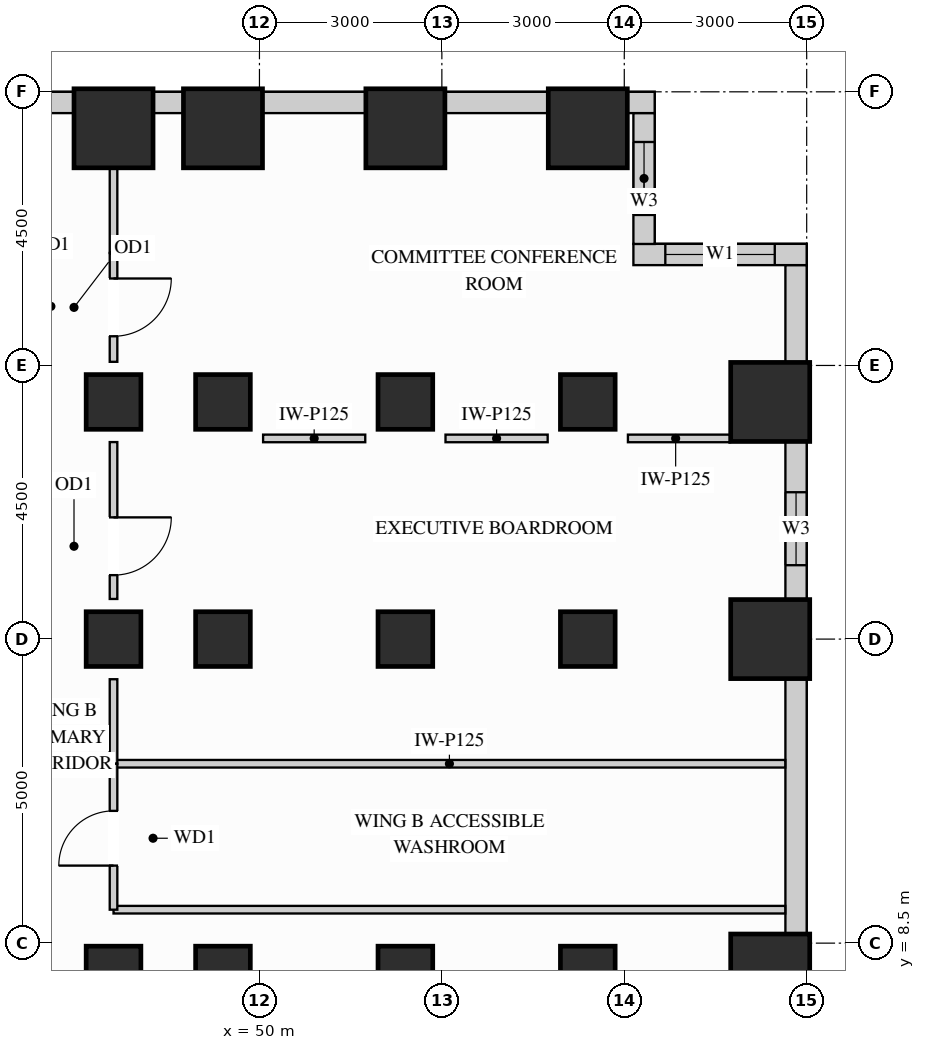
"""IFC4 building model, lengths in metres.
Left out: names, types, materials, properties, quantities, classifications, styles, units other than length and angle.
Written with IfcOpenShell. Run it as: python <this file> out.ifc"""

import sys

from ifc_helpers import new_model, si_unit, direction, frame, frame_2d, origin, origin_2d, place, context, subcontext, project, spatial, rectangle, extrude, source, transform, mapped, element, fill, save


model = new_model("IFC4")
c1 = context("Model", 3, precision=1e-05, world=origin(), true_north=direction((0.0, 1.0)))
c2 = subcontext(c1, "Body", "Model", "MODEL_VIEW")
j1 = project(units=[si_unit("LENGTHUNIT", "METRE"), si_unit("PLANEANGLEUNIT", "RADIAN")], contexts=[c1])
p1 = place(None, origin())
s1 = spatial("IfcSite", under=j1, at=p1, CompositionType="ELEMENT")
p2 = place(p1, origin())
s2 = spatial("IfcBuilding", under=s1, at=p2, CompositionType="ELEMENT")
p3 = place(p2, frame((0.0, 0.0, 29.7)))
s3 = spatial("IfcBuildingStorey", under=s2, at=p3, CompositionType="ELEMENT", Elevation=29.7)
m1 = source(origin(), c2, "Body", "SweptSolid", [
    extrude(rectangle(XDim=0.9, YDim=0.9, at=origin_2d()), origin(), (0.0, 0.0, 1.0), 3.38),
])
for number, where, z_axis, x_axis in (
    (1, (47.6, 13.5, 0.0), (0.0, 0.0, 1.0), (1.0, 0.0, 0.0)),
    (2, (47.6, 8.0, 0.0), (0.0, 0.0, 1.0), (1.0, 0.0, 0.0)),
    (3, (47.6, 17.4, 0.0), (0.0, 0.0, 1.0), (1.0, 0.0, 0.0)),
    (4, (49.4, 13.5, 0.0), (0.0, 0.0, 1.0), (1.0, 0.0, 0.0)),
    (5, (49.4, 17.4, 0.0), (0.0, 0.0, 1.0), (1.0, 0.0, 0.0)),
    (6, (49.4, 8.0, 0.0), (0.0, 0.0, 1.0), (1.0, 0.0, 0.0)),
    (7, (52.4, 13.5, 0.0), (0.0, 0.0, 1.0), (1.0, 0.0, 0.0)),
    (8, (52.4, 17.4, 0.0), (0.0, 0.0, 1.0), (1.0, 0.0, 0.0)),
    (9, (52.4, 8.0, 0.0), (0.0, 0.0, 1.0), (1.0, 0.0, 0.0)),
    (10, (55.4, 13.5, 0.0), (0.0, 0.0, 1.0), (1.0, 0.0, 0.0)),
    (11, (55.4, 17.4, 0.0), (0.0, 0.0, 1.0), (1.0, 0.0, 0.0)),
    (12, (55.4, 8.0, 0.0), (0.0, 0.0, 1.0), (1.0, 0.0, 0.0)),
):
    element("IfcColumn", number, at=place(p3, frame(where, z_axis=z_axis, x_axis=x_axis)), inside=s3, PredefinedType="COLUMN", context=c2, shape_type="MappedRepresentation", body=[
        mapped(m1, transform((0.0, 0.0, 0.0), x_axis=(1.0, 0.0, 0.0), y_axis=(0.0, 1.0, 0.0), z_axis=(0.0, 0.0, 1.0))),
    ])
m2 = source(origin(), c2, "Body", "SweptSolid", [
    extrude(rectangle(XDim=1.3, YDim=1.3, at=origin_2d()), origin(), (0.0, 0.0, 1.0), 3.38),
])
for number, where, z_axis, x_axis in (
    (13, (47.6, 21.9, 0.0), (0.0, 0.0, 1.0), (1.0, 0.0, 0.0)),
    (14, (49.4, 21.9, 0.0), (0.0, 0.0, 1.0), (1.0, 0.0, 0.0)),
    (15, (52.4, 21.9, 0.0), (0.0, 0.0, 1.0), (1.0, 0.0, 0.0)),
    (16, (55.4, 21.9, 0.0), (0.0, 0.0, 1.0), (1.0, 0.0, 0.0)),
    (17, (58.4, 13.5, 0.0), (0.0, 0.0, 1.0), (1.0, 0.0, 0.0)),
    (18, (58.4, 17.4, 0.0), (0.0, 0.0, 1.0), (1.0, 0.0, 0.0)),
    (19, (58.4, 8.0, 0.0), (0.0, 0.0, 1.0), (1.0, 0.0, 0.0)),
):
    element("IfcColumn", number, at=place(p3, frame(where, z_axis=z_axis, x_axis=x_axis)), inside=s3, PredefinedType="COLUMN", context=c2, shape_type="MappedRepresentation", body=[
        mapped(m2, transform((0.0, 0.0, 0.0), x_axis=(1.0, 0.0, 0.0), y_axis=(0.0, 1.0, 0.0), z_axis=(0.0, 0.0, 1.0))),
    ])
m3 = source(origin(), c2, "Body", "SweptSolid", [
    extrude(rectangle(XDim=4.204, YDim=0.35, at=frame_2d((2.102, 0.0))), origin(), (0.0, 0.0, 1.0), 2.51),
])
p4 = place(p3, frame((58.825, 8.648, 0.0), z_axis=(0.0, 0.0, 1.0), x_axis=(0.0, 1.0, 0.0)))
e20 = element("IfcWall", 20, at=p4, inside=s3, PredefinedType="SOLIDWALL", context=c2, shape_type="MappedRepresentation", body=[
    mapped(m3, transform((0.0, 0.0, 0.0), x_axis=(1.0, 0.0, 0.0), y_axis=(0.0, 1.0, 0.0), z_axis=(0.0, 0.0, 1.0))),
])
p5 = place(p3, frame((58.825, 14.148, 0.0), z_axis=(0.0, 0.0, 1.0), x_axis=(0.0, 1.0, 0.0)))
e21 = element("IfcWall", 21, at=p5, inside=s3, PredefinedType="SOLIDWALL", context=c2, shape_type="SweptSolid", body=[
    extrude(rectangle(XDim=2.604, YDim=0.35, at=frame_2d((1.302, 0.0))), origin(), (0.0, 0.0, 1.0), 2.51),
])
p6 = place(p5, frame((0.567, 0.0, 0.78)))
e22 = element("IfcOpeningElement", 22, at=p6, cuts=e21, PredefinedType="OPENING", context=c2, shape_type="SweptSolid", body=[
    extrude(rectangle(XDim=1.2, YDim=1.55, at=frame_2d((0.6, 0.775))), frame((0.0, 0.185, 0.0), z_axis=(0.0, -1.0, 0.0), x_axis=(1.0, 0.0, 0.0)), (0.0, 0.0, 1.0), 0.37),
])
m4 = source(origin(), c2, "Body", "SweptSolid", [
    extrude(rectangle(XDim=1.604, YDim=0.35, at=frame_2d((0.802, 0.0))), origin(), (0.0, 0.0, 1.0), 3.365),
])
p7 = place(p3, frame((58.825, 18.048, 0.0), z_axis=(0.0, 0.0, 1.0), x_axis=(0.0, 1.0, 0.0)))
e23 = element("IfcWall", 23, at=p7, inside=s3, PredefinedType="SOLIDWALL", context=c2, shape_type="MappedRepresentation", body=[
    mapped(m4, transform((0.0, 0.0, 0.0), x_axis=(1.0, 0.0, 0.0), y_axis=(0.0, 1.0, 0.0), z_axis=(0.0, 0.0, 1.0))),
])
p8 = place(p3, frame((59.0, 19.825, 0.0), z_axis=(0.0, 0.0, 1.0), x_axis=(-1.0, 0.0, 0.0)))
e24 = element("IfcWall", 24, at=p8, inside=s3, PredefinedType="SOLIDWALL", context=c2, shape_type="SweptSolid", body=[
    extrude(rectangle(XDim=2.85, YDim=0.35, at=frame_2d((1.425, 0.0))), origin(), (0.0, 0.0, 1.0), 3.365),
])
p9 = place(p8, frame((0.525, 0.0, 0.78)))
e25 = element("IfcOpeningElement", 25, at=p9, cuts=e24, PredefinedType="OPENING", context=c2, shape_type="SweptSolid", body=[
    extrude(rectangle(XDim=1.8, YDim=2.1, at=frame_2d((0.9, 1.05))), frame((0.0, 0.185, 0.0), z_axis=(0.0, -1.0, 0.0), x_axis=(1.0, 0.0, 0.0)), (0.0, 0.0, 1.0), 0.37),
])
p10 = place(p3, frame((56.325, 19.998, 0.0), z_axis=(0.0, 0.0, 1.0), x_axis=(0.0, 1.0, 0.0)))
e26 = element("IfcWall", 26, at=p10, inside=s3, PredefinedType="SOLIDWALL", context=c2, shape_type="SweptSolid", body=[
    extrude(rectangle(XDim=2.154, YDim=0.35, at=frame_2d((1.077, 0.0))), origin(), (0.0, 0.0, 1.0), 3.365),
])
p11 = place(p10, frame((0.477, 0.0, 0.78)))
e27 = element("IfcOpeningElement", 27, at=p11, cuts=e26, PredefinedType="OPENING", context=c2, shape_type="SweptSolid", body=[
    extrude(rectangle(XDim=1.2, YDim=2.1, at=frame_2d((0.6, 1.05))), frame((0.0, 0.185, 0.0), z_axis=(0.0, -1.0, 0.0), x_axis=(1.0, 0.0, 0.0)), (0.0, 0.0, 1.0), 0.37),
])
m5 = source(origin(), c2, "Body", "SweptSolid", [
    extrude(rectangle(XDim=0.452, YDim=0.35, at=frame_2d((0.226, 0.0))), origin(), (0.0, 0.0, 1.0), 3.365),
])
p12 = place(p3, frame((56.5, 22.325, 0.0), z_axis=(0.0, 0.0, 1.0), x_axis=(-1.0, 0.0, 0.0)))
e28 = element("IfcWall", 28, at=p12, inside=s3, PredefinedType="SOLIDWALL", context=c2, shape_type="MappedRepresentation", body=[
    mapped(m5, transform((0.0, 0.0, 0.0), x_axis=(1.0, 0.0, 0.0), y_axis=(0.0, 1.0, 0.0), z_axis=(0.0, 0.0, 1.0))),
])
m6 = source(origin(), c2, "Body", "SweptSolid", [
    extrude(rectangle(XDim=1.704, YDim=0.35, at=frame_2d((0.852, 0.0))), origin(), (0.0, 0.0, 1.0), 2.51),
])
for number, where, z_axis, x_axis in (
    (29, (54.752, 22.325, 0.0), (0.0, 0.0, 1.0), (-1.0, 0.0, 0.0)),
    (30, (51.752, 22.325, 0.0), (0.0, 0.0, 1.0), (-1.0, 0.0, 0.0)),
):
    element("IfcWall", number, at=place(p3, frame(where, z_axis=z_axis, x_axis=x_axis)), inside=s3, PredefinedType="SOLIDWALL", context=c2, shape_type="MappedRepresentation", body=[
        mapped(m6, transform((0.0, 0.0, 0.0), x_axis=(1.0, 0.0, 0.0), y_axis=(0.0, 1.0, 0.0), z_axis=(0.0, 0.0, 1.0))),
    ])
m7 = source(origin(), c2, "Body", "SweptSolid", [
    extrude(rectangle(XDim=0.504, YDim=0.35, at=frame_2d((0.252, 0.0))), origin(), (0.0, 0.0, 1.0), 3.365),
])
p13 = place(p3, frame((48.752, 22.325, 0.0), z_axis=(0.0, 0.0, 1.0), x_axis=(-1.0, 0.0, 0.0)))
e31 = element("IfcWall", 31, at=p13, inside=s3, PredefinedType="SOLIDWALL", context=c2, shape_type="MappedRepresentation", body=[
    mapped(m7, transform((0.0, 0.0, 0.0), x_axis=(1.0, 0.0, 0.0), y_axis=(0.0, 1.0, 0.0), z_axis=(0.0, 0.0, 1.0))),
])
p14 = place(p3, frame((46.952, 22.325, 0.0), z_axis=(0.0, 0.0, 1.0), x_axis=(-1.0, 0.0, 0.0)))
e32 = element("IfcWall", 32, at=p14, inside=s3, PredefinedType="SOLIDWALL", context=c2, shape_type="SweptSolid", body=[
    extrude(rectangle(XDim=6.304, YDim=0.35, at=frame_2d((3.152, 0.0))), origin(), (0.0, 0.0, 1.0), 2.51),
])
p15 = place(p14, frame((1.649, 0.0, 0.78)))
e33 = element("IfcOpeningElement", 33, at=p15, cuts=e32, PredefinedType="OPENING", context=c2, shape_type="SweptSolid", body=[
    extrude(rectangle(XDim=1.8, YDim=1.55, at=frame_2d((0.9, 0.775))), frame((0.0, 0.185, 0.0), z_axis=(0.0, -1.0, 0.0), x_axis=(1.0, 0.0, 0.0)), (0.0, 0.0, 1.0), 0.37),
])
p16 = place(p14, frame((3.817, 0.0, 0.78)))
e34 = element("IfcOpeningElement", 34, at=p16, cuts=e32, PredefinedType="OPENING", context=c2, shape_type="SweptSolid", body=[
    extrude(rectangle(XDim=1.8, YDim=1.55, at=frame_2d((0.9, 0.775))), frame((0.0, 0.185, 0.0), z_axis=(0.0, -1.0, 0.0), x_axis=(1.0, 0.0, 0.0)), (0.0, 0.0, 1.0), 0.37),
])
m8 = source(origin(), c2, "Body", "SweptSolid", [
    extrude(rectangle(XDim=11.048, YDim=0.125, at=frame_2d((5.524, 0.0))), origin(), (0.0, 0.0, 1.0), 3.365),
])
p17 = place(p3, frame((47.6, 11.45, 0.0), z_axis=(0.0, 0.0, 1.0), x_axis=(1.0, 0.0, 0.0)))
e35 = element("IfcWall", 35, at=p17, inside=s3, PredefinedType="PARTITIONING", context=c2, shape_type="MappedRepresentation", body=[
    mapped(m8, transform((0.0, 0.0, 0.0), x_axis=(1.0, 0.0, 0.0), y_axis=(0.0, 1.0, 0.0), z_axis=(0.0, 0.0, 1.0))),
])
m9 = source(origin(), c2, "Body", "SweptSolid", [
    extrude(rectangle(XDim=1.68, YDim=0.125, at=frame_2d((0.84, 0.0))), origin(), (0.0, 0.0, 1.0), 2.67),
])
for number, where, z_axis, x_axis in (
    (36, (50.06, 16.8, 0.0), (0.0, 0.0, 1.0), (1.0, 0.0, 0.0)),
    (37, (53.06, 16.8, 0.0), (0.0, 0.0, 1.0), (1.0, 0.0, 0.0)),
    (38, (56.06, 16.8, 0.0), (0.0, 0.0, 1.0), (1.0, 0.0, 0.0)),
):
    element("IfcWall", number, at=place(p3, frame(where, z_axis=z_axis, x_axis=x_axis)), inside=s3, PredefinedType="PARTITIONING", context=c2, shape_type="MappedRepresentation", body=[
        mapped(m9, transform((0.0, 0.0, 0.0), x_axis=(1.0, 0.0, 0.0), y_axis=(0.0, 1.0, 0.0), z_axis=(0.0, 0.0, 1.0))),
    ])
p18 = place(p3, frame((47.6, 9.05, 0.0), z_axis=(0.0, 0.0, 1.0), x_axis=(1.0, 0.0, 0.0)))
e39 = element("IfcWall", 39, at=p18, inside=s3, PredefinedType="PARTITIONING", context=c2, shape_type="MappedRepresentation", body=[
    mapped(m8, transform((0.0, 0.0, 0.0), x_axis=(1.0, 0.0, 0.0), y_axis=(0.0, 1.0, 0.0), z_axis=(0.0, 0.0, 1.0))),
])
m10 = source(origin(), c2, "Body", "SweptSolid", [
    extrude(rectangle(XDim=1.39, YDim=0.125, at=frame_2d((0.695, 0.0))), origin(), (0.0, 0.0, 1.0), 2.67),
])
p19 = place(p3, frame((47.6, 11.45, 0.0), z_axis=(0.0, 0.0, 1.0), x_axis=(0.0, 1.0, 0.0)))
e40 = element("IfcWall", 40, at=p19, inside=s3, PredefinedType="PARTITIONING", context=c2, shape_type="MappedRepresentation", body=[
    mapped(m10, transform((0.0, 0.0, 0.0), x_axis=(1.0, 0.0, 0.0), y_axis=(0.0, 1.0, 0.0), z_axis=(0.0, 0.0, 1.0))),
])
p20 = place(p3, frame((47.6, 14.16, 0.0), z_axis=(0.0, 0.0, 1.0), x_axis=(0.0, 1.0, 0.0)))
e41 = element("IfcWall", 41, at=p20, inside=s3, PredefinedType="PARTITIONING", context=c2, shape_type="SweptSolid", body=[
    extrude(rectangle(XDim=2.58, YDim=0.125, at=frame_2d((1.29, 0.0))), origin(), (0.0, 0.0, 1.0), 2.67),
])
p21 = place(p20, frame((0.392, 0.0, 0.0)))
e42 = element("IfcOpeningElement", 42, at=p21, cuts=e41, PredefinedType="OPENING", context=c2, shape_type="SweptSolid", body=[
    extrude(rectangle(XDim=0.95, YDim=2.15, at=frame_2d((0.475, 1.075))), frame((0.0, 0.073, 0.0), z_axis=(0.0, -1.0, 0.0), x_axis=(1.0, 0.0, 0.0)), (0.0, 0.0, 1.0), 0.145),
])
p22 = place(p3, frame((47.6, 18.06, 0.0), z_axis=(0.0, 0.0, 1.0), x_axis=(0.0, 1.0, 0.0)))
e43 = element("IfcWall", 43, at=p22, inside=s3, PredefinedType="PARTITIONING", context=c2, shape_type="SweptSolid", body=[
    extrude(rectangle(XDim=1.79, YDim=0.125, at=frame_2d((0.895, 0.0))), origin(), (0.0, 0.0, 1.0), 2.67),
])
p23 = place(p22, frame((0.42, 0.0, 0.0)))
e44 = element("IfcOpeningElement", 44, at=p23, cuts=e43, PredefinedType="OPENING", context=c2, shape_type="SweptSolid", body=[
    extrude(rectangle(XDim=0.95, YDim=2.15, at=frame_2d((0.475, 1.075))), frame((0.0, 0.073, 0.0), z_axis=(0.0, -1.0, 0.0), x_axis=(1.0, 0.0, 0.0)), (0.0, 0.0, 1.0), 0.145),
])
m11 = source(origin(), c2, "Body", "SweptSolid", [
    extrude(rectangle(XDim=1.39, YDim=0.125, at=frame_2d((0.695, 0.0))), origin(), (0.0, 0.0, 1.0), 2.67),
])
p24 = place(p3, frame((47.6, 19.85, 0.0), z_axis=(0.0, 0.0, 1.0), x_axis=(0.0, 1.0, 0.0)))
e45 = element("IfcWall", 45, at=p24, inside=s3, PredefinedType="PARTITIONING", context=c2, shape_type="MappedRepresentation", body=[
    mapped(m11, transform((0.0, 0.0, 0.0), x_axis=(1.0, 0.0, 0.0), y_axis=(0.0, 1.0, 0.0), z_axis=(0.0, 0.0, 1.0))),
])
p25 = place(p3, frame((47.6, 9.05, 0.0), z_axis=(0.0, 0.0, 1.0), x_axis=(0.0, 1.0, 0.0)))
e46 = element("IfcWall", 46, at=p25, inside=s3, PredefinedType="PARTITIONING", context=c2, shape_type="SweptSolid", body=[
    extrude(rectangle(XDim=2.4, YDim=0.125, at=frame_2d((1.2, 0.0))), origin(), (0.0, 0.0, 1.0), 2.67),
])
p26 = place(p25, frame((0.725, 0.0, 0.0)))
e47 = element("IfcOpeningElement", 47, at=p26, cuts=e46, PredefinedType="OPENING", context=c2, shape_type="SweptSolid", body=[
    extrude(rectangle(XDim=0.9, YDim=2.15, at=frame_2d((0.45, 1.075))), frame((0.0, 0.073, 0.0), z_axis=(0.0, -1.0, 0.0), x_axis=(1.0, 0.0, 0.0)), (0.0, 0.0, 1.0), 0.145),
])
m12 = source(origin(), c2, "Body", "SweptSolid", [
    extrude(rectangle(XDim=0.95, YDim=2.15, at=frame_2d((0.475, 1.075))), frame((0.0, 0.025, 0.0), z_axis=(0.0, -1.0, 0.0), x_axis=(1.0, 0.0, 0.0)), (0.0, 0.0, 1.0), 0.05),
])
p27 = place(p21, origin())
e48 = element("IfcDoor", 48, at=p27, inside=s3, OperationType="SINGLE_SWING_RIGHT", PredefinedType="DOOR", context=c2, shape_type="MappedRepresentation", body=[
    mapped(m12, transform((0.0, 0.0, 0.0), x_axis=(1.0, 0.0, 0.0), y_axis=(0.0, 1.0, 0.0), z_axis=(0.0, 0.0, 1.0))),
])
fill(e42, e48)
p28 = place(p23, origin())
e49 = element("IfcDoor", 49, at=p28, inside=s3, OperationType="SINGLE_SWING_RIGHT", PredefinedType="DOOR", context=c2, shape_type="MappedRepresentation", body=[
    mapped(m12, transform((0.0, 0.0, 0.0), x_axis=(1.0, 0.0, 0.0), y_axis=(0.0, 1.0, 0.0), z_axis=(0.0, 0.0, 1.0))),
])
fill(e44, e49)
m13 = source(origin(), c2, "Body", "SweptSolid", [
    extrude(rectangle(XDim=0.9, YDim=2.15, at=frame_2d((0.45, 1.075))), frame((0.0, 0.025, 0.0), z_axis=(0.0, -1.0, 0.0), x_axis=(1.0, 0.0, 0.0)), (0.0, 0.0, 1.0), 0.05),
])
p29 = place(p26, origin())
e50 = element("IfcDoor", 50, at=p29, inside=s3, OperationType="SINGLE_SWING_LEFT", PredefinedType="DOOR", context=c2, shape_type="MappedRepresentation", body=[
    mapped(m13, transform((0.0, 0.0, 0.0), x_axis=(1.0, 0.0, 0.0), y_axis=(0.0, 1.0, 0.0), z_axis=(0.0, 0.0, 1.0))),
])
fill(e47, e50)
m14 = source(origin(), c2, "Body", "SweptSolid", [
    extrude(rectangle(XDim=1.8, YDim=2.1, at=frame_2d((0.9, 1.05))), frame((0.0, 0.03, 0.0), z_axis=(0.0, -1.0, 0.0), x_axis=(1.0, 0.0, 0.0)), (0.0, 0.0, 1.0), 0.06),
])
p30 = place(p9, origin())
e51 = element("IfcWindow", 51, at=p30, inside=s3, PartitioningType="SINGLE_PANEL", PredefinedType="WINDOW", context=c2, shape_type="MappedRepresentation", body=[
    mapped(m14, transform((0.0, 0.0, 0.0), x_axis=(1.0, 0.0, 0.0), y_axis=(0.0, 1.0, 0.0), z_axis=(0.0, 0.0, 1.0))),
])
fill(e25, e51)
m15 = source(origin(), c2, "Body", "SweptSolid", [
    extrude(rectangle(XDim=1.2, YDim=1.55, at=frame_2d((0.6, 0.775))), frame((0.0, 0.03, 0.0), z_axis=(0.0, -1.0, 0.0), x_axis=(1.0, 0.0, 0.0)), (0.0, 0.0, 1.0), 0.06),
])
p31 = place(p6, origin())
e52 = element("IfcWindow", 52, at=p31, inside=s3, PartitioningType="SINGLE_PANEL", PredefinedType="WINDOW", context=c2, shape_type="MappedRepresentation", body=[
    mapped(m15, transform((0.0, 0.0, 0.0), x_axis=(1.0, 0.0, 0.0), y_axis=(0.0, 1.0, 0.0), z_axis=(0.0, 0.0, 1.0))),
])
fill(e22, e52)
m16 = source(origin(), c2, "Body", "SweptSolid", [
    extrude(rectangle(XDim=1.2, YDim=2.1, at=frame_2d((0.6, 1.05))), frame((0.0, 0.03, 0.0), z_axis=(0.0, -1.0, 0.0), x_axis=(1.0, 0.0, 0.0)), (0.0, 0.0, 1.0), 0.06),
])
p32 = place(p11, origin())
e53 = element("IfcWindow", 53, at=p32, inside=s3, PartitioningType="SINGLE_PANEL", PredefinedType="WINDOW", context=c2, shape_type="MappedRepresentation", body=[
    mapped(m16, transform((0.0, 0.0, 0.0), x_axis=(1.0, 0.0, 0.0), y_axis=(0.0, 1.0, 0.0), z_axis=(0.0, 0.0, 1.0))),
])
fill(e27, e53)
save(model, sys.argv[1])
